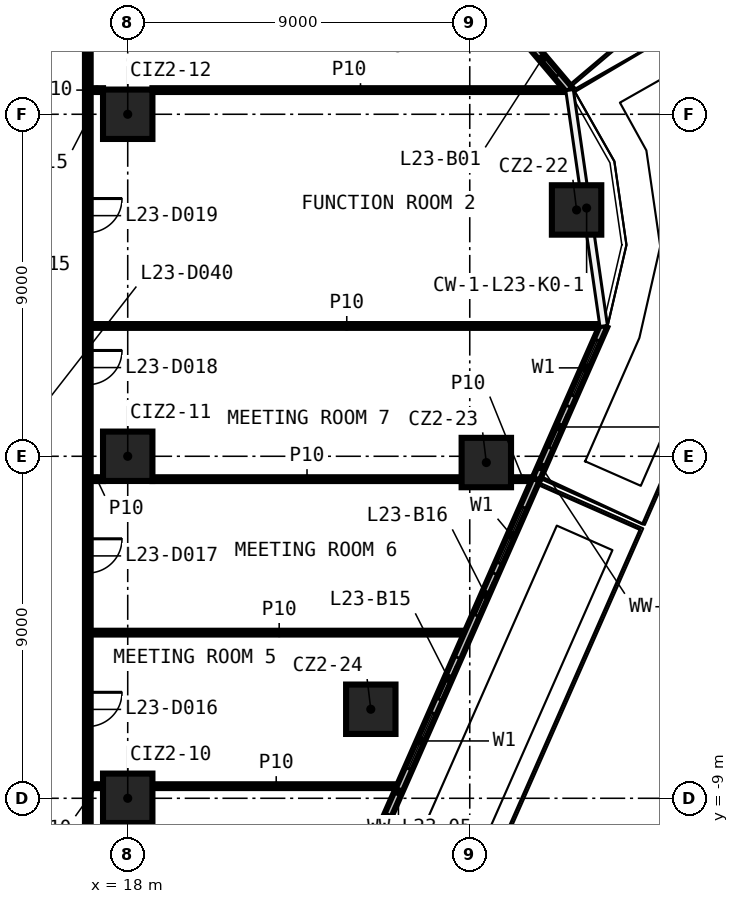
"""IFC4 building model, lengths in metres.
Left out: names, types, materials, properties, quantities, classifications, styles, units other than length and angle.
Written with IfcOpenShell. Run it as: python <this file> out.ifc"""

import sys

from ifc_helpers import new_model, si_unit, direction, frame, frame_2d, origin, origin_2d, place, context, subcontext, project, spatial, rectangle, extrude, element, fill, save


model = new_model("IFC4")
c1 = context("Model", 3, precision=1e-05, world=origin(), true_north=direction((0.0, 1.0)))
c2 = subcontext(c1, "Body", "Model", "MODEL_VIEW")
j1 = project(units=[si_unit("LENGTHUNIT", "METRE"), si_unit("PLANEANGLEUNIT", "RADIAN")], contexts=[c1])
p1 = place(None, origin())
s1 = spatial("IfcSite", under=j1, at=p1, CompositionType="ELEMENT")
p2 = place(p1, origin())
s2 = spatial("IfcBuilding", under=s1, at=p2, CompositionType="ELEMENT")
p3 = place(p2, frame((0.0, 0.0, 110.0)))
s3 = spatial("IfcBuildingStorey", under=s2, at=p3, CompositionType="ELEMENT", Elevation=110.0)
for number, where, z_axis, x_axis in (
    (1, (29.811, 6.482, 0.0), (0.0, 0.0, 1.0), (1.0, 0.0, 0.0)),
    (2, (27.436, -0.165, 0.0), (0.0, 0.0, 1.0), (1.0, 0.0, 0.0)),
    (3, (24.396, -6.657, 0.0), (0.0, 0.0, 1.0), (1.0, 0.0, 0.0)),
    (4, (18.0, -9.0, 0.0), (0.0, 0.0, 1.0), (1.0, 0.0, 0.0)),
    (5, (18.0, 0.0, 0.0), (0.0, 0.0, 1.0), (1.0, 0.0, 0.0)),
    (6, (18.0, 9.0, 0.0), (0.0, 0.0, 1.0), (1.0, 0.0, 0.0)),
):
    element("IfcColumn", number, at=place(p3, frame(where, z_axis=z_axis, x_axis=x_axis)), inside=s3, PredefinedType="COLUMN", context=c2, shape_type="SweptSolid", body=[
        extrude(rectangle(XDim=1.3, YDim=1.3, at=origin_2d()), origin(), (0.0, 0.0, 1.0), 3.3),
    ])
p4 = place(p3, frame((17.025, -8.681, 0.0), z_axis=(0.0, 0.0, 1.0), x_axis=(1.0, 0.0, 0.0)))
e7 = element("IfcWall", 7, at=p4, inside=s3, PredefinedType="PARTITIONING", context=c2, shape_type="SweptSolid", body=[
    extrude(rectangle(XDim=0.325, YDim=0.1, at=frame_2d((0.163, 0.0))), origin(), (0.0, 0.0, 1.0), 3.3),
])
p5 = place(p3, frame((18.65, -8.681, 0.0), z_axis=(0.0, 0.0, 1.0), x_axis=(1.0, 0.0, 0.0)))
e8 = element("IfcWall", 8, at=p5, inside=s3, PredefinedType="PARTITIONING", context=c2, shape_type="SweptSolid", body=[
    extrude(rectangle(XDim=6.515, YDim=0.1, at=frame_2d((3.258, 0.0))), origin(), (0.0, 0.0, 1.0), 3.3),
])
p6 = place(p3, frame((17.025, -4.641, 0.0), z_axis=(0.0, 0.0, 1.0), x_axis=(1.0, 0.0, 0.0)))
e9 = element("IfcWall", 9, at=p6, inside=s3, PredefinedType="PARTITIONING", context=c2, shape_type="SweptSolid", body=[
    extrude(rectangle(XDim=9.92, YDim=0.1, at=frame_2d((4.96, 0.0))), origin(), (0.0, 0.0, 1.0), 3.3),
])
p7 = place(p3, frame((17.025, -0.602, 0.0), z_axis=(0.0, 0.0, 1.0), x_axis=(1.0, 0.0, 0.0)))
e10 = element("IfcWall", 10, at=p7, inside=s3, PredefinedType="PARTITIONING", context=c2, shape_type="SweptSolid", body=[
    extrude(rectangle(XDim=0.325, YDim=0.1, at=frame_2d((0.163, 0.0))), origin(), (0.0, 0.0, 1.0), 3.3),
])
p8 = place(p3, frame((18.65, -0.602, 0.0), z_axis=(0.0, 0.0, 1.0), x_axis=(1.0, 0.0, 0.0)))
e11 = element("IfcWall", 11, at=p8, inside=s3, PredefinedType="PARTITIONING", context=c2, shape_type="SweptSolid", body=[
    extrude(rectangle(XDim=8.136, YDim=0.1, at=frame_2d((4.068, 0.0))), origin(), (0.0, 0.0, 1.0), 3.3),
])
p9 = place(p3, frame((28.086, -0.602, 0.0), z_axis=(0.0, 0.0, 1.0), x_axis=(1.0, 0.0, 0.0)))
e12 = element("IfcWall", 12, at=p9, inside=s3, PredefinedType="PARTITIONING", context=c2, shape_type="SweptSolid", body=[
    extrude(rectangle(XDim=0.64, YDim=0.1, at=frame_2d((0.32, 0.0))), origin(), (0.0, 0.0, 1.0), 3.3),
])
p10 = place(p3, frame((17.025, 3.429, 0.0), z_axis=(0.0, 0.0, 1.0), x_axis=(1.0, 0.0, 0.0)))
e13 = element("IfcWall", 13, at=p10, inside=s3, PredefinedType="PARTITIONING", context=c2, shape_type="SweptSolid", body=[
    extrude(rectangle(XDim=13.477, YDim=0.1, at=frame_2d((6.739, 0.0))), origin(), (0.0, 0.0, 1.0), 3.3),
])
p11 = place(p3, frame((17.025, 9.636, 0.0), z_axis=(0.0, 0.0, 1.0), x_axis=(1.0, 0.0, 0.0)))
e14 = element("IfcWall", 14, at=p11, inside=s3, PredefinedType="PARTITIONING", context=c2, shape_type="SweptSolid", body=[
    extrude(rectangle(XDim=0.325, YDim=0.1, at=frame_2d((0.163, 0.0))), origin(), (0.0, 0.0, 1.0), 3.3),
])
p12 = place(p3, frame((18.65, 9.636, 0.0), z_axis=(0.0, 0.0, 1.0), x_axis=(1.0, 0.0, 0.0)))
e15 = element("IfcWall", 15, at=p12, inside=s3, PredefinedType="PARTITIONING", context=c2, shape_type="SweptSolid", body=[
    extrude(rectangle(XDim=10.95, YDim=0.1, at=frame_2d((5.475, 0.0))), origin(), (0.0, 0.0, 1.0), 3.3),
])
p13 = place(p3, frame((16.95, 13.875, 0.0), z_axis=(0.0, 0.0, 1.0), x_axis=(0.0, -1.0, 0.0)))
e16 = element("IfcWall", 16, at=p13, inside=s3, PredefinedType="PARTITIONING", context=c2, shape_type="SweptSolid", body=[
    extrude(rectangle(XDim=27.75, YDim=0.15, at=frame_2d((13.875, 0.0))), origin(), (0.0, 0.0, 1.0), 3.3),
])
p14 = place(p13, frame((24.917, 0.0, 0.0)))
e17 = element("IfcOpeningElement", 17, at=p14, cuts=e16, PredefinedType="OPENING", context=c2, shape_type="SweptSolid", body=[
    extrude(rectangle(XDim=0.9, YDim=2.1, at=frame_2d((0.45, 1.05))), frame((0.0, 0.085, 0.0), z_axis=(0.0, -1.0, 0.0), x_axis=(1.0, 0.0, 0.0)), (0.0, 0.0, 1.0), 0.17),
])
p15 = place(p13, frame((20.086, 0.0, 0.0)))
e18 = element("IfcOpeningElement", 18, at=p15, cuts=e16, PredefinedType="OPENING", context=c2, shape_type="SweptSolid", body=[
    extrude(rectangle(XDim=0.9, YDim=2.1, at=frame_2d((0.45, 1.05))), frame((0.0, 0.085, 0.0), z_axis=(0.0, -1.0, 0.0), x_axis=(1.0, 0.0, 0.0)), (0.0, 0.0, 1.0), 0.17),
])
p16 = place(p13, frame((16.047, 0.0, 0.0)))
e19 = element("IfcOpeningElement", 19, at=p16, cuts=e16, PredefinedType="OPENING", context=c2, shape_type="SweptSolid", body=[
    extrude(rectangle(XDim=0.9, YDim=2.1, at=frame_2d((0.45, 1.05))), frame((0.0, 0.085, 0.0), z_axis=(0.0, -1.0, 0.0), x_axis=(1.0, 0.0, 0.0)), (0.0, 0.0, 1.0), 0.17),
])
p17 = place(p13, frame((11.091, 0.0, 0.0)))
e20 = element("IfcOpeningElement", 20, at=p17, cuts=e16, PredefinedType="OPENING", context=c2, shape_type="SweptSolid", body=[
    extrude(rectangle(XDim=0.9, YDim=2.1, at=frame_2d((0.45, 1.05))), frame((0.0, 0.085, 0.0), z_axis=(0.0, -1.0, 0.0), x_axis=(1.0, 0.0, 0.0)), (0.0, 0.0, 1.0), 0.17),
])
p18 = place(p13, frame((7.093, 0.0, 0.0)))
e21 = element("IfcOpeningElement", 21, at=p18, cuts=e16, PredefinedType="OPENING", context=c2, shape_type="SweptSolid", body=[
    extrude(rectangle(XDim=0.9, YDim=2.1, at=frame_2d((0.45, 1.05))), frame((0.0, 0.085, 0.0), z_axis=(0.0, -1.0, 0.0), x_axis=(1.0, 0.0, 0.0)), (0.0, 0.0, 1.0), 0.17),
])
p19 = place(p13, frame((2.057, 0.0, 0.0)))
e22 = element("IfcOpeningElement", 22, at=p19, cuts=e16, PredefinedType="OPENING", context=c2, shape_type="SweptSolid", body=[
    extrude(rectangle(XDim=0.9, YDim=2.1, at=frame_2d((0.45, 1.05))), frame((0.0, 0.085, 0.0), z_axis=(0.0, -1.0, 0.0), x_axis=(1.0, 0.0, 0.0)), (0.0, 0.0, 1.0), 0.17),
])
p20 = place(p3, frame((29.626, 9.636, 0.0), z_axis=(0.0, 0.0, 1.0), x_axis=(-0.6460547702, 0.763291054514, 0.0)))
e23 = element("IfcWall", 23, at=p20, inside=s3, PredefinedType="SOLIDWALL", context=c2, shape_type="SweptSolid", body=[
    extrude(rectangle(XDim=13.615, YDim=0.2, at=frame_2d((6.808, 0.0))), origin(), (0.0, 0.0, 1.0), 3.3),
])
p21 = place(p20, frame((2.0, 0.0, 0.6)))
e24 = element("IfcOpeningElement", 24, at=p21, cuts=e23, PredefinedType="OPENING", context=c2, shape_type="SweptSolid", body=[
    extrude(rectangle(XDim=1.6, YDim=2.4, at=frame_2d((0.8, 1.2))), frame((0.0, 0.11, 0.0), z_axis=(0.0, -1.0, 0.0), x_axis=(1.0, 0.0, 0.0)), (0.0, 0.0, 1.0), 0.22),
])
p22 = place(p20, frame((0.5, 0.0, 0.0)))
e25 = element("IfcOpeningElement", 25, at=p22, cuts=e23, PredefinedType="OPENING", context=c2, shape_type="SweptSolid", body=[
    extrude(rectangle(XDim=1.2, YDim=2.4, at=frame_2d((0.6, 1.2))), frame((0.0, 0.11, 0.0), z_axis=(0.0, -1.0, 0.0), x_axis=(1.0, 0.0, 0.0)), (0.0, 0.0, 1.0), 0.22),
])
p23 = place(p20, frame((6.538, 0.0, 0.6)))
e26 = element("IfcOpeningElement", 26, at=p23, cuts=e23, PredefinedType="OPENING", context=c2, shape_type="SweptSolid", body=[
    extrude(rectangle(XDim=1.6, YDim=2.4, at=frame_2d((0.8, 1.2))), frame((0.0, 0.11, 0.0), z_axis=(0.0, -1.0, 0.0), x_axis=(1.0, 0.0, 0.0)), (0.0, 0.0, 1.0), 0.22),
])
p24 = place(p20, frame((5.038, 0.0, 0.0)))
e27 = element("IfcOpeningElement", 27, at=p24, cuts=e23, PredefinedType="OPENING", context=c2, shape_type="SweptSolid", body=[
    extrude(rectangle(XDim=1.2, YDim=2.4, at=frame_2d((0.6, 1.2))), frame((0.0, 0.11, 0.0), z_axis=(0.0, -1.0, 0.0), x_axis=(1.0, 0.0, 0.0)), (0.0, 0.0, 1.0), 0.22),
])
p25 = place(p20, frame((9.577, 0.0, 0.6)))
e28 = element("IfcOpeningElement", 28, at=p25, cuts=e23, PredefinedType="OPENING", context=c2, shape_type="SweptSolid", body=[
    extrude(rectangle(XDim=1.6, YDim=2.4, at=frame_2d((0.8, 1.2))), frame((0.0, 0.11, 0.0), z_axis=(0.0, -1.0, 0.0), x_axis=(1.0, 0.0, 0.0)), (0.0, 0.0, 1.0), 0.22),
])
p26 = place(p20, frame((11.577, 0.0, 0.0)))
e29 = element("IfcOpeningElement", 29, at=p26, cuts=e23, PredefinedType="OPENING", context=c2, shape_type="SweptSolid", body=[
    extrude(rectangle(XDim=1.2, YDim=2.4, at=frame_2d((0.6, 1.2))), frame((0.0, 0.11, 0.0), z_axis=(0.0, -1.0, 0.0), x_axis=(1.0, 0.0, 0.0)), (0.0, 0.0, 1.0), 0.22),
])
p27 = place(p3, frame((21.626, -16.76, 0.0), z_axis=(0.0, 0.0, 1.0), x_axis=(0.403293642116, 0.915070619258, 0.0)))
e30 = element("IfcWall", 30, at=p27, inside=s3, PredefinedType="SOLIDWALL", context=c2, shape_type="SweptSolid", body=[
    extrude(rectangle(XDim=17.657, YDim=0.2, at=frame_2d((8.829, 0.0))), origin(), (0.0, 0.0, 1.0), 3.3),
])
p28 = place(p27, frame((2.0, 0.0, 0.6)))
e31 = element("IfcOpeningElement", 31, at=p28, cuts=e30, PredefinedType="OPENING", context=c2, shape_type="SweptSolid", body=[
    extrude(rectangle(XDim=1.6, YDim=2.4, at=frame_2d((0.8, 1.2))), frame((0.0, 0.11, 0.0), z_axis=(0.0, -1.0, 0.0), x_axis=(1.0, 0.0, 0.0)), (0.0, 0.0, 1.0), 0.22),
])
p29 = place(p27, frame((0.5, 0.0, 0.0)))
e32 = element("IfcOpeningElement", 32, at=p29, cuts=e30, PredefinedType="OPENING", context=c2, shape_type="SweptSolid", body=[
    extrude(rectangle(XDim=1.2, YDim=2.4, at=frame_2d((0.6, 1.2))), frame((0.0, 0.11, 0.0), z_axis=(0.0, -1.0, 0.0), x_axis=(1.0, 0.0, 0.0)), (0.0, 0.0, 1.0), 0.22),
])
p30 = place(p27, frame((6.414, 0.0, 0.6)))
e33 = element("IfcOpeningElement", 33, at=p30, cuts=e30, PredefinedType="OPENING", context=c2, shape_type="SweptSolid", body=[
    extrude(rectangle(XDim=1.6, YDim=2.4, at=frame_2d((0.8, 1.2))), frame((0.0, 0.11, 0.0), z_axis=(0.0, -1.0, 0.0), x_axis=(1.0, 0.0, 0.0)), (0.0, 0.0, 1.0), 0.22),
])
p31 = place(p27, frame((4.914, 0.0, 0.0)))
e34 = element("IfcOpeningElement", 34, at=p31, cuts=e30, PredefinedType="OPENING", context=c2, shape_type="SweptSolid", body=[
    extrude(rectangle(XDim=1.2, YDim=2.4, at=frame_2d((0.6, 1.2))), frame((0.0, 0.11, 0.0), z_axis=(0.0, -1.0, 0.0), x_axis=(1.0, 0.0, 0.0)), (0.0, 0.0, 1.0), 0.22),
])
p32 = place(p27, frame((9.329, 0.0, 0.6)))
e35 = element("IfcOpeningElement", 35, at=p32, cuts=e30, PredefinedType="OPENING", context=c2, shape_type="SweptSolid", body=[
    extrude(rectangle(XDim=1.6, YDim=2.4, at=frame_2d((0.8, 1.2))), frame((0.0, 0.11, 0.0), z_axis=(0.0, -1.0, 0.0), x_axis=(1.0, 0.0, 0.0)), (0.0, 0.0, 1.0), 0.22),
])
p33 = place(p27, frame((11.329, 0.0, 0.0)))
e36 = element("IfcOpeningElement", 36, at=p33, cuts=e30, PredefinedType="OPENING", context=c2, shape_type="SweptSolid", body=[
    extrude(rectangle(XDim=1.2, YDim=2.4, at=frame_2d((0.6, 1.2))), frame((0.0, 0.11, 0.0), z_axis=(0.0, -1.0, 0.0), x_axis=(1.0, 0.0, 0.0)), (0.0, 0.0, 1.0), 0.22),
])
p34 = place(p27, frame((15.243, 0.0, 0.6)))
e37 = element("IfcOpeningElement", 37, at=p34, cuts=e30, PredefinedType="OPENING", context=c2, shape_type="SweptSolid", body=[
    extrude(rectangle(XDim=1.6, YDim=2.4, at=frame_2d((0.8, 1.2))), frame((0.0, 0.11, 0.0), z_axis=(0.0, -1.0, 0.0), x_axis=(1.0, 0.0, 0.0)), (0.0, 0.0, 1.0), 0.22),
])
p35 = place(p27, frame((13.743, 0.0, 0.0)))
e38 = element("IfcOpeningElement", 38, at=p35, cuts=e30, PredefinedType="OPENING", context=c2, shape_type="SweptSolid", body=[
    extrude(rectangle(XDim=1.2, YDim=2.4, at=frame_2d((0.6, 1.2))), frame((0.0, 0.11, 0.0), z_axis=(0.0, -1.0, 0.0), x_axis=(1.0, 0.0, 0.0)), (0.0, 0.0, 1.0), 0.22),
])
p36 = place(p3, frame((28.748, -0.602, 0.0), z_axis=(0.0, 0.0, 1.0), x_axis=(0.403256746057, 0.91508687935, 0.0)))
e39 = element("IfcWall", 39, at=p36, inside=s3, PredefinedType="SOLIDWALL", context=c2, shape_type="SweptSolid", body=[
    extrude(rectangle(XDim=4.405, YDim=0.2, at=frame_2d((2.203, 0.0))), origin(), (0.0, 0.0, 1.0), 3.3),
])
p37 = place(p36, frame((2.4, 0.0, 0.6)))
e40 = element("IfcOpeningElement", 40, at=p37, cuts=e39, PredefinedType="OPENING", context=c2, shape_type="SweptSolid", body=[
    extrude(rectangle(XDim=1.6, YDim=2.4, at=frame_2d((0.8, 1.2))), frame((0.0, 0.11, 0.0), z_axis=(0.0, -1.0, 0.0), x_axis=(1.0, 0.0, 0.0)), (0.0, 0.0, 1.0), 0.22),
])
p38 = place(p36, frame((0.9, 0.0, 0.0)))
e41 = element("IfcOpeningElement", 41, at=p38, cuts=e39, PredefinedType="OPENING", context=c2, shape_type="SweptSolid", body=[
    extrude(rectangle(XDim=1.2, YDim=2.4, at=frame_2d((0.6, 1.2))), frame((0.0, 0.11, 0.0), z_axis=(0.0, -1.0, 0.0), x_axis=(1.0, 0.0, 0.0)), (0.0, 0.0, 1.0), 0.22),
])
p39 = place(p15, origin())
e42 = element("IfcDoor", 42, at=p39, inside=s3, OperationType="SINGLE_SWING_LEFT", PredefinedType="DOOR", context=c2, shape_type="SweptSolid", body=[
    extrude(rectangle(XDim=0.9, YDim=2.1, at=frame_2d((0.45, 1.05))), frame((0.0, 0.025, 0.0), z_axis=(0.0, -1.0, 0.0), x_axis=(1.0, 0.0, 0.0)), (0.0, 0.0, 1.0), 0.05),
])
fill(e18, e42)
p40 = place(p16, origin())
e43 = element("IfcDoor", 43, at=p40, inside=s3, OperationType="SINGLE_SWING_RIGHT", PredefinedType="DOOR", context=c2, shape_type="SweptSolid", body=[
    extrude(rectangle(XDim=0.9, YDim=2.1, at=frame_2d((0.45, 1.05))), frame((0.0, 0.025, 0.0), z_axis=(0.0, -1.0, 0.0), x_axis=(1.0, 0.0, 0.0)), (0.0, 0.0, 1.0), 0.05),
])
fill(e19, e43)
p41 = place(p17, origin())
e44 = element("IfcDoor", 44, at=p41, inside=s3, OperationType="SINGLE_SWING_LEFT", PredefinedType="DOOR", context=c2, shape_type="SweptSolid", body=[
    extrude(rectangle(XDim=0.9, YDim=2.1, at=frame_2d((0.45, 1.05))), frame((0.0, 0.025, 0.0), z_axis=(0.0, -1.0, 0.0), x_axis=(1.0, 0.0, 0.0)), (0.0, 0.0, 1.0), 0.05),
])
fill(e20, e44)
p42 = place(p18, origin())
e45 = element("IfcDoor", 45, at=p42, inside=s3, OperationType="SINGLE_SWING_RIGHT", PredefinedType="DOOR", context=c2, shape_type="SweptSolid", body=[
    extrude(rectangle(XDim=0.9, YDim=2.1, at=frame_2d((0.45, 1.05))), frame((0.0, 0.025, 0.0), z_axis=(0.0, -1.0, 0.0), x_axis=(1.0, 0.0, 0.0)), (0.0, 0.0, 1.0), 0.05),
])
fill(e21, e45)
p43 = place(p22, origin())
e46 = element("IfcDoor", 46, at=p43, inside=s3, OperationType="SLIDING_TO_LEFT", PredefinedType="DOOR", context=c2, shape_type="SweptSolid", body=[
    extrude(rectangle(XDim=1.2, YDim=2.4, at=frame_2d((0.6, 1.2))), frame((0.0, 0.025, 0.0), z_axis=(0.0, -1.0, 0.0), x_axis=(1.0, 0.0, 0.0)), (0.0, 0.0, 1.0), 0.05),
])
fill(e25, e46)
p44 = place(p30, origin())
e47 = element("IfcWindow", 47, at=p44, inside=s3, PartitioningType="SINGLE_PANEL", PredefinedType="WINDOW", context=c2, shape_type="SweptSolid", body=[
    extrude(rectangle(XDim=1.6, YDim=2.4, at=frame_2d((0.8, 1.2))), frame((0.0, 0.03, 0.0), z_axis=(0.0, -1.0, 0.0), x_axis=(1.0, 0.0, 0.0)), (0.0, 0.0, 1.0), 0.06),
])
fill(e33, e47)
p45 = place(p32, origin())
e48 = element("IfcWindow", 48, at=p45, inside=s3, PartitioningType="SINGLE_PANEL", PredefinedType="WINDOW", context=c2, shape_type="SweptSolid", body=[
    extrude(rectangle(XDim=1.6, YDim=2.4, at=frame_2d((0.8, 1.2))), frame((0.0, 0.03, 0.0), z_axis=(0.0, -1.0, 0.0), x_axis=(1.0, 0.0, 0.0)), (0.0, 0.0, 1.0), 0.06),
])
fill(e35, e48)
p46 = place(p33, origin())
e49 = element("IfcDoor", 49, at=p46, inside=s3, OperationType="SLIDING_TO_LEFT", PredefinedType="DOOR", context=c2, shape_type="SweptSolid", body=[
    extrude(rectangle(XDim=1.2, YDim=2.4, at=frame_2d((0.6, 1.2))), frame((0.0, 0.025, 0.0), z_axis=(0.0, -1.0, 0.0), x_axis=(1.0, 0.0, 0.0)), (0.0, 0.0, 1.0), 0.05),
])
fill(e36, e49)
p47 = place(p34, origin())
e50 = element("IfcWindow", 50, at=p47, inside=s3, PartitioningType="SINGLE_PANEL", PredefinedType="WINDOW", context=c2, shape_type="SweptSolid", body=[
    extrude(rectangle(XDim=1.6, YDim=2.4, at=frame_2d((0.8, 1.2))), frame((0.0, 0.03, 0.0), z_axis=(0.0, -1.0, 0.0), x_axis=(1.0, 0.0, 0.0)), (0.0, 0.0, 1.0), 0.06),
])
fill(e37, e50)
p48 = place(p35, origin())
e51 = element("IfcDoor", 51, at=p48, inside=s3, OperationType="SLIDING_TO_LEFT", PredefinedType="DOOR", context=c2, shape_type="SweptSolid", body=[
    extrude(rectangle(XDim=1.2, YDim=2.4, at=frame_2d((0.6, 1.2))), frame((0.0, 0.025, 0.0), z_axis=(0.0, -1.0, 0.0), x_axis=(1.0, 0.0, 0.0)), (0.0, 0.0, 1.0), 0.05),
])
fill(e38, e51)
p49 = place(p37, origin())
e52 = element("IfcWindow", 52, at=p49, inside=s3, PartitioningType="SINGLE_PANEL", PredefinedType="WINDOW", context=c2, shape_type="SweptSolid", body=[
    extrude(rectangle(XDim=1.6, YDim=2.4, at=frame_2d((0.8, 1.2))), frame((0.0, 0.03, 0.0), z_axis=(0.0, -1.0, 0.0), x_axis=(1.0, 0.0, 0.0)), (0.0, 0.0, 1.0), 0.06),
])
fill(e40, e52)
p50 = place(p38, origin())
e53 = element("IfcDoor", 53, at=p50, inside=s3, OperationType="SLIDING_TO_LEFT", PredefinedType="DOOR", context=c2, shape_type="SweptSolid", body=[
    extrude(rectangle(XDim=1.2, YDim=2.4, at=frame_2d((0.6, 1.2))), frame((0.0, 0.025, 0.0), z_axis=(0.0, -1.0, 0.0), x_axis=(1.0, 0.0, 0.0)), (0.0, 0.0, 1.0), 0.05),
])
fill(e41, e53)
save(model, sys.argv[1])
